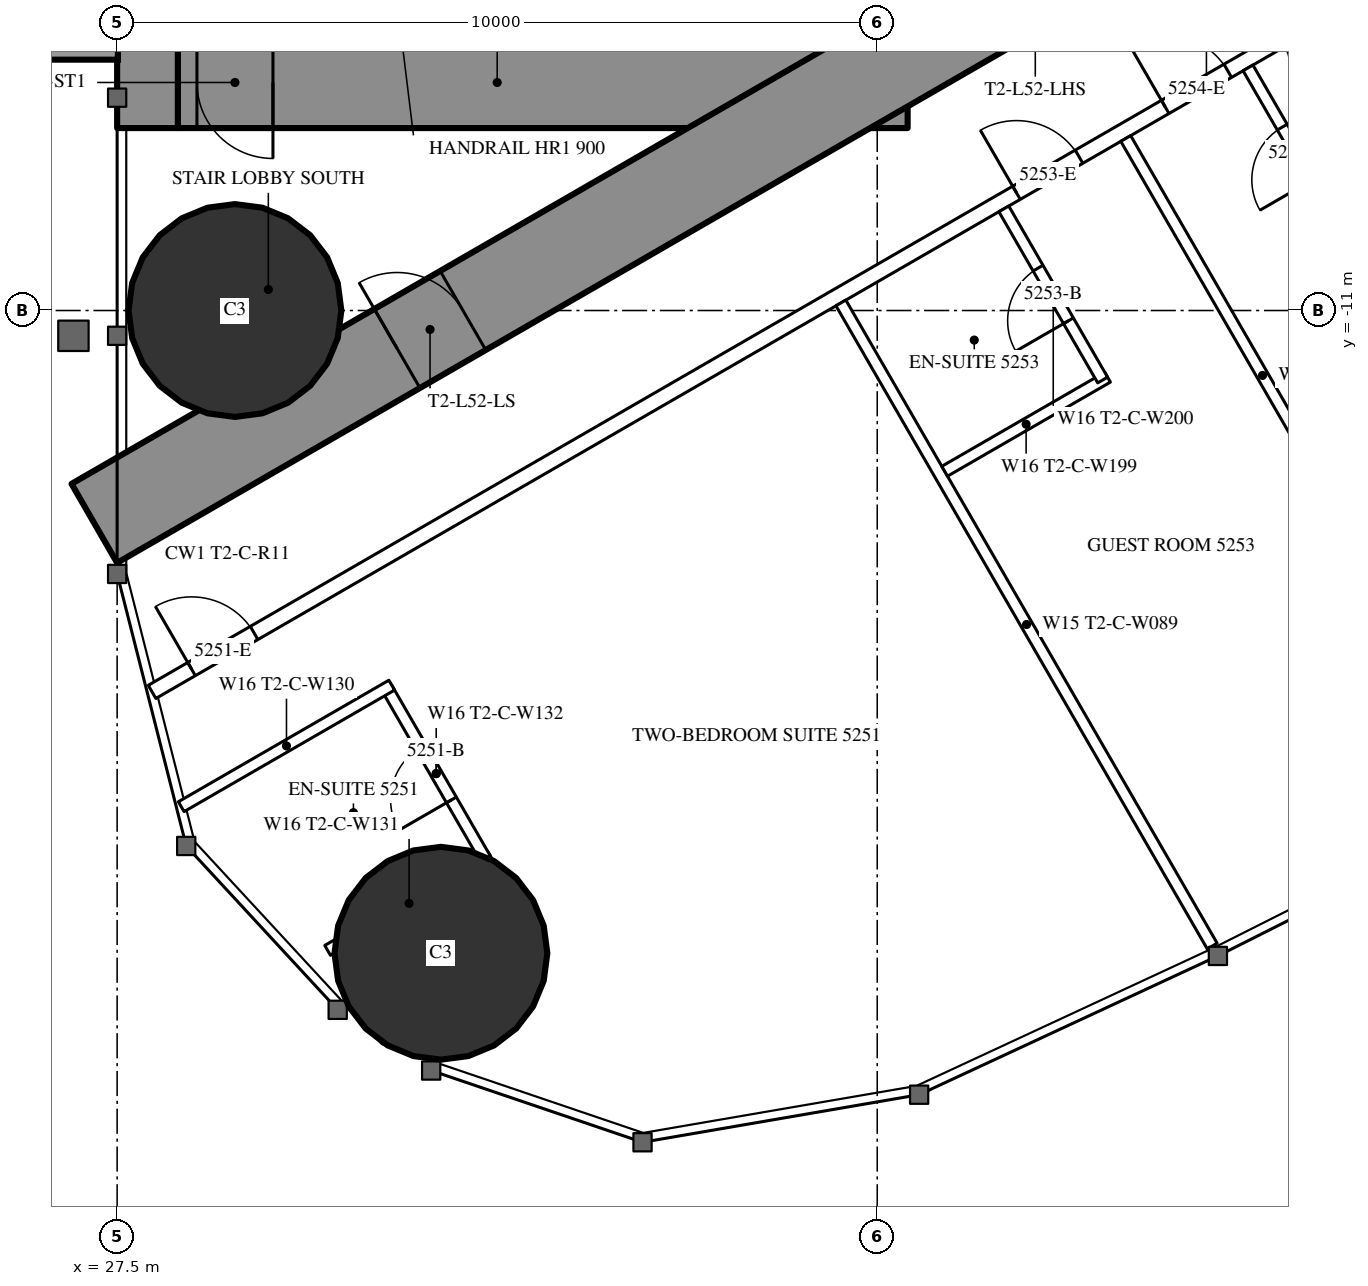
"""IFC4 building model, lengths in metres.
Left out: names, types, materials, properties, quantities, classifications, styles, units other than length and angle.
Written with IfcOpenShell. Run it as: python <this file> out.ifc"""

import sys

from ifc_helpers import new_model, si_unit, direction, frame, frame_2d, origin, origin_2d, place, context, subcontext, project, spatial, rectangle, circle, extrude, element, fill, save


model = new_model("IFC4")
c1 = context("Model", 3, precision=1e-05, world=origin(), true_north=direction((0.0, 1.0)))
c2 = subcontext(c1, "Body", "Model", "MODEL_VIEW")
j1 = project(units=[si_unit("LENGTHUNIT", "METRE"), si_unit("PLANEANGLEUNIT", "RADIAN")], contexts=[c1])
p1 = place(None, origin())
s1 = spatial("IfcSite", under=j1, at=p1, CompositionType="ELEMENT")
p2 = place(p1, origin())
s2 = spatial("IfcBuilding", under=s1, at=p2, CompositionType="ELEMENT")
p3 = place(p2, frame((0.0, 0.0, 194.8)))
s3 = spatial("IfcBuildingStorey", under=s2, at=p3, CompositionType="ELEMENT", Elevation=194.8)
for number, where, z_axis, x_axis in (
    (1, (31.76, -19.456, 0.0), (0.0, 0.0, 1.0), (1.0, 0.0, 0.0)),
    (2, (29.05, -11.0, 0.0), (0.0, 0.0, 1.0), (1.0, 0.0, 0.0)),
):
    element("IfcColumn", number, at=place(p3, frame(where, z_axis=z_axis, x_axis=x_axis)), inside=s3, PredefinedType="COLUMN", context=c2, shape_type="SweptSolid", body=[
        extrude(circle(Radius=1.4, at=origin_2d()), origin(), (0.0, 0.0, 1.0), 3.5),
    ])
p4 = place(p3, frame((27.9, -8.6, 0.0), z_axis=(0.0, 0.0, 1.0), x_axis=(0.0, 1.0, 0.0)))
e3 = element("IfcWall", 3, at=p4, inside=s3, PredefinedType="SHEAR", context=c2, shape_type="SweptSolid", body=[
    extrude(rectangle(XDim=17.2, YDim=0.8, at=frame_2d((8.6, 0.0))), origin(), (0.0, 0.0, 1.0), 3.5),
])
p5 = place(p4, frame((2.45, 0.0, 0.6)))
e4 = element("IfcOpeningElement", 4, at=p5, cuts=e3, PredefinedType="OPENING", context=c2, shape_type="SweptSolid", body=[
    extrude(rectangle(XDim=0.6, YDim=2.1, at=frame_2d((0.3, 1.05))), frame((0.0, 0.41, 0.0), z_axis=(0.0, -1.0, 0.0), x_axis=(1.0, 0.0, 0.0)), (0.0, 0.0, 1.0), 0.82),
])
p6 = place(p4, frame((14.15, 0.0, 0.6)))
e5 = element("IfcOpeningElement", 5, at=p6, cuts=e3, PredefinedType="OPENING", context=c2, shape_type="SweptSolid", body=[
    extrude(rectangle(XDim=0.6, YDim=2.1, at=frame_2d((0.3, 1.05))), frame((0.0, 0.41, 0.0), z_axis=(0.0, -1.0, 0.0), x_axis=(1.0, 0.0, 0.0)), (0.0, 0.0, 1.0), 0.82),
])
p7 = place(p3, frame((37.3, -8.6, 0.0), z_axis=(0.0, 0.0, 1.0), x_axis=(0.0, 1.0, 0.0)))
e6 = element("IfcWall", 6, at=p7, inside=s3, PredefinedType="SHEAR", context=c2, shape_type="SweptSolid", body=[
    extrude(rectangle(XDim=17.2, YDim=1.2, at=frame_2d((8.6, 0.0))), origin(), (0.0, 0.0, 1.0), 3.5),
])
p8 = place(p7, frame((7.7, 0.0, 0.0)))
e7 = element("IfcOpeningElement", 7, at=p8, cuts=e6, PredefinedType="OPENING", context=c2, shape_type="SweptSolid", body=[
    extrude(rectangle(XDim=1.8, YDim=2.2, at=frame_2d((0.9, 1.1))), frame((0.0, 0.61, 0.0), z_axis=(0.0, -1.0, 0.0), x_axis=(1.0, 0.0, 0.0)), (0.0, 0.0, 1.0), 1.22),
])
p9 = place(p3, frame((28.3, -8.0, 0.0), z_axis=(0.0, 0.0, 1.0), x_axis=(1.0, 0.0, 0.0)))
e8 = element("IfcWall", 8, at=p9, inside=s3, PredefinedType="SHEAR", context=c2, shape_type="SweptSolid", body=[
    extrude(rectangle(XDim=8.4, YDim=1.2, at=frame_2d((4.2, 0.0))), origin(), (0.0, 0.0, 1.0), 3.5),
])
p10 = place(p9, frame((0.25, 0.0, 0.0)))
e9 = element("IfcOpeningElement", 9, at=p10, cuts=e8, PredefinedType="OPENING", context=c2, shape_type="SweptSolid", body=[
    extrude(rectangle(XDim=1.0, YDim=2.2, at=frame_2d((0.5, 1.1))), frame((0.0, 0.61, 0.0), z_axis=(0.0, -1.0, 0.0), x_axis=(1.0, 0.0, 0.0)), (0.0, 0.0, 1.0), 1.22),
])
p11 = place(p3, frame((27.2, -13.8, 0.0), z_axis=(0.0, 0.0, 1.0), x_axis=(0.866027159892, 0.499996958321, 0.0)))
e10 = element("IfcWall", 10, at=p11, inside=s3, PredefinedType="SHEAR", context=c2, shape_type="SweptSolid", body=[
    extrude(rectangle(XDim=27.947, YDim=1.2, at=frame_2d((13.973, 0.0))), origin(), (0.0, 0.0, 1.0), 3.5),
])
p12 = place(p11, frame((4.6, 0.0, 0.0)))
e11 = element("IfcOpeningElement", 11, at=p12, cuts=e10, PredefinedType="OPENING", context=c2, shape_type="SweptSolid", body=[
    extrude(rectangle(XDim=1.0, YDim=2.2, at=frame_2d((0.5, 1.1))), frame((0.0, 0.61, 0.0), z_axis=(0.0, -1.0, 0.0), x_axis=(1.0, 0.0, 0.0)), (0.0, 0.0, 1.0), 1.22),
])
p13 = place(p11, frame((13.395, 0.0, 0.0)))
e12 = element("IfcOpeningElement", 12, at=p13, cuts=e10, PredefinedType="OPENING", context=c2, shape_type="SweptSolid", body=[
    extrude(rectangle(XDim=1.8, YDim=2.2, at=frame_2d((0.9, 1.1))), frame((0.0, 0.61, 0.0), z_axis=(0.0, -1.0, 0.0), x_axis=(1.0, 0.0, 0.0)), (0.0, 0.0, 1.0), 1.22),
])
p14 = place(p3, frame((27.959, -16.017, 0.0), z_axis=(0.0, 0.0, 1.0), x_axis=(0.866024151371, 0.500002169237, 0.0)))
e13 = element("IfcWall", 13, at=p14, inside=s3, PredefinedType="PARTITIONING", context=c2, shape_type="SweptSolid", body=[
    extrude(rectangle(XDim=32.034, YDim=0.2, at=frame_2d((16.017, 0.0))), origin(), (0.0, 0.0, 1.0), 3.25),
])
p15 = place(p14, frame((0.6, 0.0, 0.0)))
e14 = element("IfcOpeningElement", 14, at=p15, cuts=e13, PredefinedType="OPENING", context=c2, shape_type="SweptSolid", body=[
    extrude(rectangle(XDim=0.95, YDim=2.2, at=frame_2d((0.475, 1.1))), frame((0.0, 0.11, 0.0), z_axis=(0.0, -1.0, 0.0), x_axis=(1.0, 0.0, 0.0)), (0.0, 0.0, 1.0), 0.22),
])
p16 = place(p14, frame((13.132, 0.0, 0.0)))
e15 = element("IfcOpeningElement", 15, at=p16, cuts=e13, PredefinedType="OPENING", context=c2, shape_type="SweptSolid", body=[
    extrude(rectangle(XDim=0.95, YDim=2.2, at=frame_2d((0.475, 1.1))), frame((0.0, 0.11, 0.0), z_axis=(0.0, -1.0, 0.0), x_axis=(1.0, 0.0, 0.0)), (0.0, 0.0, 1.0), 0.22),
])
p17 = place(p14, frame((15.391, 0.0, 0.0)))
e16 = element("IfcOpeningElement", 16, at=p17, cuts=e13, PredefinedType="OPENING", context=c2, shape_type="SweptSolid", body=[
    extrude(rectangle(XDim=0.95, YDim=2.2, at=frame_2d((0.475, 1.1))), frame((0.0, 0.11, 0.0), z_axis=(0.0, -1.0, 0.0), x_axis=(1.0, 0.0, 0.0)), (0.0, 0.0, 1.0), 0.22),
])
p18 = place(p14, frame((19.441, 0.0, 0.0)))
e17 = element("IfcOpeningElement", 17, at=p18, cuts=e13, PredefinedType="OPENING", context=c2, shape_type="SweptSolid", body=[
    extrude(rectangle(XDim=0.95, YDim=2.2, at=frame_2d((0.475, 1.1))), frame((0.0, 0.11, 0.0), z_axis=(0.0, -1.0, 0.0), x_axis=(1.0, 0.0, 0.0)), (0.0, 0.0, 1.0), 0.22),
])
p19 = place(p14, frame((26.406, 0.0, 0.0)))
e18 = element("IfcOpeningElement", 18, at=p19, cuts=e13, PredefinedType="OPENING", context=c2, shape_type="SweptSolid", body=[
    extrude(rectangle(XDim=0.95, YDim=2.2, at=frame_2d((0.475, 1.1))), frame((0.0, 0.11, 0.0), z_axis=(0.0, -1.0, 0.0), x_axis=(1.0, 0.0, 0.0)), (0.0, 0.0, 1.0), 0.22),
])
p20 = place(p14, frame((28.87, 0.0, 0.0)))
e19 = element("IfcOpeningElement", 19, at=p20, cuts=e13, PredefinedType="OPENING", context=c2, shape_type="SweptSolid", body=[
    extrude(rectangle(XDim=1.8, YDim=2.2, at=frame_2d((0.9, 1.1))), frame((0.0, 0.11, 0.0), z_axis=(0.0, -1.0, 0.0), x_axis=(1.0, 0.0, 0.0)), (0.0, 0.0, 1.0), 0.22),
])
p21 = place(p3, frame((37.022, -10.9, 0.0), z_axis=(0.0, 0.0, 1.0), x_axis=(0.499998620953, -0.866026199976, 0.0)))
e20 = element("IfcWall", 20, at=p21, inside=s3, PredefinedType="PARTITIONING", context=c2, shape_type="SweptSolid", body=[
    extrude(rectangle(XDim=9.77, YDim=0.15, at=frame_2d((4.885, 0.0))), origin(), (0.0, 0.0, 1.0), 3.25),
])
p22 = place(p3, frame((40.769, -8.737, 0.0), z_axis=(0.0, 0.0, 1.0), x_axis=(0.500013115284, -0.866017831539, 0.0)))
e21 = element("IfcWall", 21, at=p22, inside=s3, PredefinedType="PARTITIONING", context=c2, shape_type="SweptSolid", body=[
    extrude(rectangle(XDim=7.198, YDim=0.15, at=frame_2d((3.599, 0.0))), origin(), (0.0, 0.0, 1.0), 2.3),
])
p23 = place(p3, frame((30.269, -19.418, 0.0), z_axis=(0.0, 0.0, 1.0), x_axis=(0.866006523861, 0.500032699561, 0.0)))
e22 = element("IfcWall", 22, at=p23, inside=s3, PredefinedType="PARTITIONING", context=c2, shape_type="SweptSolid", body=[
    extrude(rectangle(XDim=2.475, YDim=0.15, at=frame_2d((1.237, 0.0))), origin(), (0.0, 0.0, 1.0), 3.25),
])
p24 = place(p3, frame((31.048, -15.966, 0.0), z_axis=(0.0, 0.0, 1.0), x_axis=(0.499936506574, -0.866062058628, 0.0)))
e23 = element("IfcWall", 23, at=p24, inside=s3, PredefinedType="PARTITIONING", context=c2, shape_type="SweptSolid", body=[
    extrude(rectangle(XDim=2.6, YDim=0.15, at=frame_2d((1.3, 0.0))), origin(), (0.0, 0.0, 1.0), 2.3),
])
p25 = place(p24, frame((0.9, 0.0, 0.0)))
e24 = element("IfcOpeningElement", 24, at=p25, cuts=e23, PredefinedType="OPENING", context=c2, shape_type="SweptSolid", body=[
    extrude(rectangle(XDim=0.8, YDim=2.2, at=frame_2d((0.4, 1.1))), frame((0.0, 0.085, 0.0), z_axis=(0.0, -1.0, 0.0), x_axis=(1.0, 0.0, 0.0)), (0.0, 0.0, 1.0), 0.17),
])
p26 = place(p3, frame((28.343, -17.528, 0.0), z_axis=(0.0, 0.0, 1.0), x_axis=(0.86600760081, 0.500030834389, 0.0)))
e25 = element("IfcWall", 25, at=p26, inside=s3, PredefinedType="PARTITIONING", context=c2, shape_type="SweptSolid", body=[
    extrude(rectangle(XDim=3.198, YDim=0.15, at=frame_2d((1.599, 0.0))), origin(), (0.0, 0.0, 1.0), 3.25),
])
p27 = place(p3, frame((38.387, -13.115, 0.0), z_axis=(0.0, 0.0, 1.0), x_axis=(0.866073894602, 0.499916002032, 0.0)))
e26 = element("IfcWall", 26, at=p27, inside=s3, PredefinedType="PARTITIONING", context=c2, shape_type="SweptSolid", body=[
    extrude(rectangle(XDim=2.475, YDim=0.15, at=frame_2d((1.238, 0.0))), origin(), (0.0, 0.0, 1.0), 3.25),
])
p28 = place(p3, frame((39.166, -9.663, 0.0), z_axis=(0.0, 0.0, 1.0), x_axis=(0.500006934395, -0.866021400173, 0.0)))
e27 = element("IfcWall", 27, at=p28, inside=s3, PredefinedType="PARTITIONING", context=c2, shape_type="SweptSolid", body=[
    extrude(rectangle(XDim=2.6, YDim=0.15, at=frame_2d((1.3, 0.0))), origin(), (0.0, 0.0, 1.0), 3.25),
])
p29 = place(p28, frame((0.9, 0.0, 0.0)))
e28 = element("IfcOpeningElement", 28, at=p29, cuts=e27, PredefinedType="OPENING", context=c2, shape_type="SweptSolid", body=[
    extrude(rectangle(XDim=0.8, YDim=2.2, at=frame_2d((0.4, 1.1))), frame((0.0, 0.085, 0.0), z_axis=(0.0, -1.0, 0.0), x_axis=(1.0, 0.0, 0.0)), (0.0, 0.0, 1.0), 0.17),
])
p30 = place(p3, frame((42.378, -7.808, 0.0), z_axis=(0.0, 0.0, 1.0), x_axis=(0.500006934395, -0.866021400173, 0.0)))
e29 = element("IfcWall", 29, at=p30, inside=s3, PredefinedType="PARTITIONING", context=c2, shape_type="SweptSolid", body=[
    extrude(rectangle(XDim=2.6, YDim=0.15, at=frame_2d((1.3, 0.0))), origin(), (0.0, 0.0, 1.0), 3.25),
])
p31 = place(p30, frame((0.9, 0.0, 0.0)))
e30 = element("IfcOpeningElement", 30, at=p31, cuts=e29, PredefinedType="OPENING", context=c2, shape_type="SweptSolid", body=[
    extrude(rectangle(XDim=0.8, YDim=2.2, at=frame_2d((0.4, 1.1))), frame((0.0, 0.085, 0.0), z_axis=(0.0, -1.0, 0.0), x_axis=(1.0, 0.0, 0.0)), (0.0, 0.0, 1.0), 0.17),
])
p32 = place(p25, origin())
e31 = element("IfcDoor", 31, at=p32, inside=s3, OperationType="SINGLE_SWING_RIGHT", PredefinedType="DOOR", context=c2, shape_type="SweptSolid", body=[
    extrude(rectangle(XDim=0.8, YDim=2.2, at=frame_2d((0.4, 1.1))), frame((0.0, 0.025, 0.0), z_axis=(0.0, -1.0, 0.0), x_axis=(1.0, 0.0, 0.0)), (0.0, 0.0, 1.0), 0.05),
])
fill(e24, e31)
p33 = place(p15, origin())
e32 = element("IfcDoor", 32, at=p33, inside=s3, OperationType="SINGLE_SWING_LEFT", PredefinedType="DOOR", context=c2, shape_type="SweptSolid", body=[
    extrude(rectangle(XDim=0.95, YDim=2.2, at=frame_2d((0.475, 1.1))), frame((0.0, 0.025, 0.0), z_axis=(0.0, -1.0, 0.0), x_axis=(1.0, 0.0, 0.0)), (0.0, 0.0, 1.0), 0.05),
])
fill(e14, e32)
p34 = place(p29, origin())
e33 = element("IfcDoor", 33, at=p34, inside=s3, OperationType="SINGLE_SWING_RIGHT", PredefinedType="DOOR", context=c2, shape_type="SweptSolid", body=[
    extrude(rectangle(XDim=0.8, YDim=2.2, at=frame_2d((0.4, 1.1))), frame((0.0, 0.025, 0.0), z_axis=(0.0, -1.0, 0.0), x_axis=(1.0, 0.0, 0.0)), (0.0, 0.0, 1.0), 0.05),
])
fill(e28, e33)
p35 = place(p16, origin())
e34 = element("IfcDoor", 34, at=p35, inside=s3, OperationType="SINGLE_SWING_LEFT", PredefinedType="DOOR", context=c2, shape_type="SweptSolid", body=[
    extrude(rectangle(XDim=0.95, YDim=2.2, at=frame_2d((0.475, 1.1))), frame((0.0, 0.025, 0.0), z_axis=(0.0, -1.0, 0.0), x_axis=(1.0, 0.0, 0.0)), (0.0, 0.0, 1.0), 0.05),
])
fill(e15, e34)
p36 = place(p31, origin())
e35 = element("IfcDoor", 35, at=p36, inside=s3, OperationType="SINGLE_SWING_RIGHT", PredefinedType="DOOR", context=c2, shape_type="SweptSolid", body=[
    extrude(rectangle(XDim=0.8, YDim=2.2, at=frame_2d((0.4, 1.1))), frame((0.0, 0.025, 0.0), z_axis=(0.0, -1.0, 0.0), x_axis=(1.0, 0.0, 0.0)), (0.0, 0.0, 1.0), 0.05),
])
fill(e30, e35)
p37 = place(p17, origin())
e36 = element("IfcDoor", 36, at=p37, inside=s3, OperationType="SINGLE_SWING_LEFT", PredefinedType="DOOR", context=c2, shape_type="SweptSolid", body=[
    extrude(rectangle(XDim=0.95, YDim=2.2, at=frame_2d((0.475, 1.1))), frame((0.0, 0.025, 0.0), z_axis=(0.0, -1.0, 0.0), x_axis=(1.0, 0.0, 0.0)), (0.0, 0.0, 1.0), 0.05),
])
fill(e16, e36)
p38 = place(p12, origin())
e37 = element("IfcDoor", 37, at=p38, inside=s3, OperationType="SINGLE_SWING_LEFT", PredefinedType="DOOR", context=c2, shape_type="SweptSolid", body=[
    extrude(rectangle(XDim=1.0, YDim=2.2, at=frame_2d((0.5, 1.1))), frame((0.0, 0.025, 0.0), z_axis=(0.0, -1.0, 0.0), x_axis=(1.0, 0.0, 0.0)), (0.0, 0.0, 1.0), 0.05),
])
fill(e11, e37)
p39 = place(p10, origin())
e38 = element("IfcDoor", 38, at=p39, inside=s3, OperationType="SINGLE_SWING_RIGHT", PredefinedType="DOOR", context=c2, shape_type="SweptSolid", body=[
    extrude(rectangle(XDim=1.0, YDim=2.2, at=frame_2d((0.5, 1.1))), frame((0.0, 0.025, 0.0), z_axis=(0.0, -1.0, 0.0), x_axis=(1.0, 0.0, 0.0)), (0.0, 0.0, 1.0), 0.05),
])
fill(e9, e38)
save(model, sys.argv[1])
